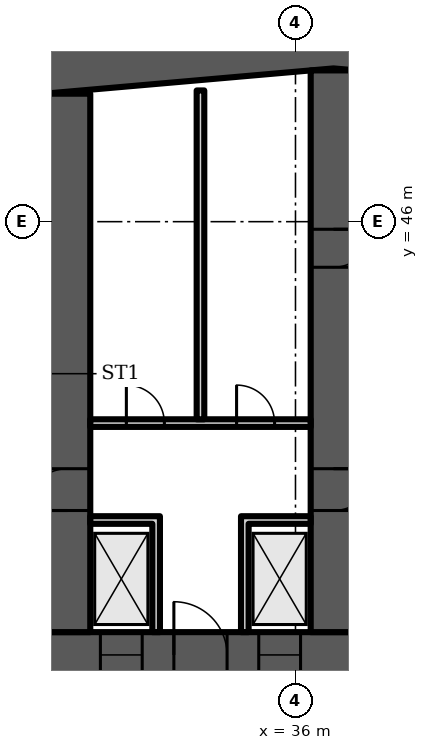
"""IFC4 building model, lengths in metres.
Left out: names, types, materials, properties, quantities, classifications, styles, units other than length and angle.
Written with IfcOpenShell. Run it as: python <this file> out.ifc"""

import sys

from ifc_helpers import new_model, si_unit, direction, frame, frame_2d, origin, place, context, subcontext, project, spatial, polyline, rectangle, outline, extrude, element, fill, save


model = new_model("IFC4")
c1 = context("Model", 3, precision=1e-05, world=origin(), true_north=direction((0.0, 1.0)))
c2 = subcontext(c1, "Body", "Model", "MODEL_VIEW")
j1 = project(units=[si_unit("LENGTHUNIT", "METRE"), si_unit("PLANEANGLEUNIT", "RADIAN")], contexts=[c1])
p1 = place(None, origin())
s1 = spatial("IfcSite", under=j1, at=p1, CompositionType="ELEMENT")
p2 = place(p1, origin())
s2 = spatial("IfcBuilding", under=s1, at=p2, CompositionType="ELEMENT")
p3 = place(p2, frame((0.0, 0.0, 70.3)))
s3 = spatial("IfcBuildingStorey", under=s2, at=p3, CompositionType="ELEMENT", Elevation=70.3)
p4 = place(p3, frame((0.0, 0.0, -0.0)))
e1 = element("IfcWall", 1, at=p4, inside=s3, PredefinedType="SHEAR", context=c2, shape_type="SweptSolid", body=[
    extrude(outline(polyline([(9.0, 47.583), (37.0, 50.032), (65.0, 47.583), (65.0, 48.787), (37.0, 51.237), (9.0, 48.787), (9.0, 47.583)])), origin(), (0.0, 0.0, 1.0), 3.6),
])
p5 = place(p3, frame((9.0, 34.6, 0.0), z_axis=(0.0, 0.0, 1.0), x_axis=(1.0, 0.0, 0.0)))
e2 = element("IfcWall", 2, at=p5, inside=s3, PredefinedType="SHEAR", context=c2, shape_type="SweptSolid", body=[
    extrude(rectangle(XDim=56.0, YDim=1.2, at=frame_2d((28.0, 0.0))), origin(), (0.0, 0.0, 1.0), 3.6),
])
p6 = place(p5, frame((3.3, 0.0, 0.0)))
e3 = element("IfcOpeningElement", 3, at=p6, cuts=e2, PredefinedType="OPENING", context=c2, shape_type="SweptSolid", body=[
    extrude(rectangle(XDim=1.0, YDim=2.1, at=frame_2d((0.5, 1.05))), frame((0.0, 0.61, 0.0), z_axis=(0.0, -1.0, 0.0), x_axis=(1.0, 0.0, 0.0)), (0.0, 0.0, 1.0), 1.22),
])
p7 = place(p5, frame((7.867, 0.0, 0.0)))
e4 = element("IfcOpeningElement", 4, at=p7, cuts=e2, PredefinedType="OPENING", context=c2, shape_type="SweptSolid", body=[
    extrude(rectangle(XDim=1.1, YDim=2.1, at=frame_2d((0.55, 1.05))), frame((0.0, 0.61, 0.0), z_axis=(0.0, -1.0, 0.0), x_axis=(1.0, 0.0, 0.0)), (0.0, 0.0, 1.0), 1.22),
])
p8 = place(p5, frame((12.033, 0.0, 0.0)))
e5 = element("IfcOpeningElement", 5, at=p8, cuts=e2, PredefinedType="OPENING", context=c2, shape_type="SweptSolid", body=[
    extrude(rectangle(XDim=1.1, YDim=2.1, at=frame_2d((0.55, 1.05))), frame((0.0, 0.61, 0.0), z_axis=(0.0, -1.0, 0.0), x_axis=(1.0, 0.0, 0.0)), (0.0, 0.0, 1.0), 1.22),
])
p9 = place(p5, frame((9.8, 0.0, 0.0)))
e6 = element("IfcOpeningElement", 6, at=p9, cuts=e2, PredefinedType="OPENING", context=c2, shape_type="SweptSolid", body=[
    extrude(rectangle(XDim=1.4, YDim=2.1, at=frame_2d((0.7, 1.05))), frame((0.0, 0.61, 0.0), z_axis=(0.0, -1.0, 0.0), x_axis=(1.0, 0.0, 0.0)), (0.0, 0.0, 1.0), 1.22),
])
p10 = place(p5, frame((14.65, 0.0, 0.0)))
e7 = element("IfcOpeningElement", 7, at=p10, cuts=e2, PredefinedType="OPENING", context=c2, shape_type="SweptSolid", body=[
    extrude(rectangle(XDim=1.2, YDim=2.1, at=frame_2d((0.6, 1.05))), frame((0.0, 0.61, 0.0), z_axis=(0.0, -1.0, 0.0), x_axis=(1.0, 0.0, 0.0)), (0.0, 0.0, 1.0), 1.22),
])
p11 = place(p5, frame((21.867, 0.0, 0.0)))
e8 = element("IfcOpeningElement", 8, at=p11, cuts=e2, PredefinedType="OPENING", context=c2, shape_type="SweptSolid", body=[
    extrude(rectangle(XDim=1.1, YDim=2.1, at=frame_2d((0.55, 1.05))), frame((0.0, 0.61, 0.0), z_axis=(0.0, -1.0, 0.0), x_axis=(1.0, 0.0, 0.0)), (0.0, 0.0, 1.0), 1.22),
])
p12 = place(p5, frame((26.033, 0.0, 0.0)))
e9 = element("IfcOpeningElement", 9, at=p12, cuts=e2, PredefinedType="OPENING", context=c2, shape_type="SweptSolid", body=[
    extrude(rectangle(XDim=1.1, YDim=2.1, at=frame_2d((0.55, 1.05))), frame((0.0, 0.61, 0.0), z_axis=(0.0, -1.0, 0.0), x_axis=(1.0, 0.0, 0.0)), (0.0, 0.0, 1.0), 1.22),
])
p13 = place(p5, frame((23.8, 0.0, 0.0)))
e10 = element("IfcOpeningElement", 10, at=p13, cuts=e2, PredefinedType="OPENING", context=c2, shape_type="SweptSolid", body=[
    extrude(rectangle(XDim=1.4, YDim=2.1, at=frame_2d((0.7, 1.05))), frame((0.0, 0.61, 0.0), z_axis=(0.0, -1.0, 0.0), x_axis=(1.0, 0.0, 0.0)), (0.0, 0.0, 1.0), 1.22),
])
p14 = place(p5, frame((28.867, 0.0, 0.0)))
e11 = element("IfcOpeningElement", 11, at=p14, cuts=e2, PredefinedType="OPENING", context=c2, shape_type="SweptSolid", body=[
    extrude(rectangle(XDim=1.1, YDim=2.1, at=frame_2d((0.55, 1.05))), frame((0.0, 0.61, 0.0), z_axis=(0.0, -1.0, 0.0), x_axis=(1.0, 0.0, 0.0)), (0.0, 0.0, 1.0), 1.22),
])
p15 = place(p5, frame((33.033, 0.0, 0.0)))
e12 = element("IfcOpeningElement", 12, at=p15, cuts=e2, PredefinedType="OPENING", context=c2, shape_type="SweptSolid", body=[
    extrude(rectangle(XDim=1.1, YDim=2.1, at=frame_2d((0.55, 1.05))), frame((0.0, 0.61, 0.0), z_axis=(0.0, -1.0, 0.0), x_axis=(1.0, 0.0, 0.0)), (0.0, 0.0, 1.0), 1.22),
])
p16 = place(p5, frame((40.15, 0.0, 0.0)))
e13 = element("IfcOpeningElement", 13, at=p16, cuts=e2, PredefinedType="OPENING", context=c2, shape_type="SweptSolid", body=[
    extrude(rectangle(XDim=1.2, YDim=2.1, at=frame_2d((0.6, 1.05))), frame((0.0, 0.61, 0.0), z_axis=(0.0, -1.0, 0.0), x_axis=(1.0, 0.0, 0.0)), (0.0, 0.0, 1.0), 1.22),
])
p17 = place(p5, frame((44.8, 0.0, 0.0)))
e14 = element("IfcOpeningElement", 14, at=p17, cuts=e2, PredefinedType="OPENING", context=c2, shape_type="SweptSolid", body=[
    extrude(rectangle(XDim=1.4, YDim=2.1, at=frame_2d((0.7, 1.05))), frame((0.0, 0.61, 0.0), z_axis=(0.0, -1.0, 0.0), x_axis=(1.0, 0.0, 0.0)), (0.0, 0.0, 1.0), 1.22),
])
p18 = place(p5, frame((49.867, 0.0, 0.0)))
e15 = element("IfcOpeningElement", 15, at=p18, cuts=e2, PredefinedType="OPENING", context=c2, shape_type="SweptSolid", body=[
    extrude(rectangle(XDim=1.1, YDim=2.1, at=frame_2d((0.55, 1.05))), frame((0.0, 0.61, 0.0), z_axis=(0.0, -1.0, 0.0), x_axis=(1.0, 0.0, 0.0)), (0.0, 0.0, 1.0), 1.22),
])
p19 = place(p5, frame((53.5, 0.0, 0.0)))
e16 = element("IfcOpeningElement", 16, at=p19, cuts=e2, PredefinedType="OPENING", context=c2, shape_type="SweptSolid", body=[
    extrude(rectangle(XDim=1.1, YDim=2.1, at=frame_2d((0.55, 1.05))), frame((0.0, 0.61, 0.0), z_axis=(0.0, -1.0, 0.0), x_axis=(1.0, 0.0, 0.0)), (0.0, 0.0, 1.0), 1.22),
])
p20 = place(p5, frame((51.567, 0.0, 0.0)))
e17 = element("IfcOpeningElement", 17, at=p20, cuts=e2, PredefinedType="OPENING", context=c2, shape_type="SweptSolid", body=[
    extrude(rectangle(XDim=1.4, YDim=2.1, at=frame_2d((0.7, 1.05))), frame((0.0, 0.61, 0.0), z_axis=(0.0, -1.0, 0.0), x_axis=(1.0, 0.0, 0.0)), (0.0, 0.0, 1.0), 1.22),
])
p21 = place(p3, frame((30.0, 35.2, 0.0), z_axis=(0.0, 0.0, 1.0), x_axis=(0.0, 1.0, 0.0)))
e18 = element("IfcWall", 18, at=p21, inside=s3, PredefinedType="SHEAR", context=c2, shape_type="SweptSolid", body=[
    extrude(rectangle(XDim=14.168, YDim=1.2, at=frame_2d((7.084, 0.0))), origin(), (0.0, 0.0, 1.0), 3.6),
])
p22 = place(p21, frame((3.2, 0.0, 0.0)))
e19 = element("IfcOpeningElement", 19, at=p22, cuts=e18, PredefinedType="OPENING", context=c2, shape_type="SweptSolid", body=[
    extrude(rectangle(XDim=1.1, YDim=2.1, at=frame_2d((0.55, 1.05))), frame((0.0, 0.61, 0.0), z_axis=(0.0, -1.0, 0.0), x_axis=(1.0, 0.0, 0.0)), (0.0, 0.0, 1.0), 1.22),
])
p23 = place(p3, frame((37.0, 35.2, 0.0), z_axis=(0.0, 0.0, 1.0), x_axis=(0.0, 1.0, 0.0)))
e20 = element("IfcWall", 20, at=p23, inside=s3, PredefinedType="SHEAR", context=c2, shape_type="SweptSolid", body=[
    extrude(rectangle(XDim=14.78, YDim=1.2, at=frame_2d((7.39, 0.0))), origin(), (0.0, 0.0, 1.0), 3.6),
])
p24 = place(p23, frame((3.2, 0.0, 0.0)))
e21 = element("IfcOpeningElement", 21, at=p24, cuts=e20, PredefinedType="OPENING", context=c2, shape_type="SweptSolid", body=[
    extrude(rectangle(XDim=1.1, YDim=2.1, at=frame_2d((0.55, 1.05))), frame((0.0, 0.61, 0.0), z_axis=(0.0, -1.0, 0.0), x_axis=(1.0, 0.0, 0.0)), (0.0, 0.0, 1.0), 1.22),
])
p25 = place(p23, frame((9.6, 0.0, 0.0)))
e22 = element("IfcOpeningElement", 22, at=p25, cuts=e20, PredefinedType="OPENING", context=c2, shape_type="SweptSolid", body=[
    extrude(rectangle(XDim=1.0, YDim=2.1, at=frame_2d((0.5, 1.05))), frame((0.0, 0.61, 0.0), z_axis=(0.0, -1.0, 0.0), x_axis=(1.0, 0.0, 0.0)), (0.0, 0.0, 1.0), 1.22),
])
p26 = place(p3, frame((30.6, 40.7, 0.0), z_axis=(0.0, 0.0, 1.0), x_axis=(1.0, 0.0, 0.0)))
e23 = element("IfcWall", 23, at=p26, inside=s3, PredefinedType="PARTITIONING", context=c2, shape_type="SweptSolid", body=[
    extrude(rectangle(XDim=5.8, YDim=0.2, at=frame_2d((2.9, 0.0))), origin(), (0.0, 0.0, 1.0), 3.2),
])
p27 = place(p26, frame((0.95, 0.0, 0.0)))
e24 = element("IfcOpeningElement", 24, at=p27, cuts=e23, PredefinedType="OPENING", context=c2, shape_type="SweptSolid", body=[
    extrude(rectangle(XDim=1.0, YDim=2.1, at=frame_2d((0.5, 1.05))), frame((0.0, 0.11, 0.0), z_axis=(0.0, -1.0, 0.0), x_axis=(1.0, 0.0, 0.0)), (0.0, 0.0, 1.0), 0.22),
])
p28 = place(p26, frame((3.85, 0.0, 0.0)))
e25 = element("IfcOpeningElement", 25, at=p28, cuts=e23, PredefinedType="OPENING", context=c2, shape_type="SweptSolid", body=[
    extrude(rectangle(XDim=1.0, YDim=2.1, at=frame_2d((0.5, 1.05))), frame((0.0, 0.11, 0.0), z_axis=(0.0, -1.0, 0.0), x_axis=(1.0, 0.0, 0.0)), (0.0, 0.0, 1.0), 0.22),
])
p29 = place(p3, frame((0.0, 0.0, -0.0)))
e26 = element("IfcWall", 26, at=p29, inside=s3, PredefinedType="PARTITIONING", context=c2, shape_type="SweptSolid", body=[
    extrude(outline(polyline([(32.233, 38.05), (30.6, 38.05), (30.6, 38.25), (32.233, 38.25), (32.433, 38.25), (32.433, 35.2), (32.233, 35.2), (32.233, 38.05)])), origin(), (0.0, 0.0, 1.0), 3.2),
])
p30 = place(p3, frame((0.0, 0.0, -0.0)))
e27 = element("IfcWall", 27, at=p30, inside=s3, PredefinedType="PARTITIONING", context=c2, shape_type="SweptSolid", body=[
    extrude(outline(polyline([(34.567, 38.25), (34.767, 38.25), (36.4, 38.25), (36.4, 38.05), (34.767, 38.05), (34.767, 35.2), (34.567, 35.2), (34.567, 38.25)])), origin(), (0.0, 0.0, 1.0), 3.2),
])
p31 = place(p3, frame((33.5, 40.8, 0.0), z_axis=(0.0, 0.0, 1.0), x_axis=(0.0, 1.0, 0.0)))
e28 = element("IfcWall", 28, at=p31, inside=s3, PredefinedType="PARTITIONING", context=c2, shape_type="SweptSolid", body=[
    extrude(rectangle(XDim=8.653, YDim=0.2, at=frame_2d((4.326, 0.0))), origin(), (0.0, 0.0, 1.0), 3.2),
])
p32 = place(p11, origin())
e29 = element("IfcDoor", 29, at=p32, inside=s3, OperationType="DOUBLE_DOOR_SLIDING", PredefinedType="DOOR", context=c2, shape_type="SweptSolid", body=[
    extrude(rectangle(XDim=1.1, YDim=2.1, at=frame_2d((0.55, 1.05))), frame((0.0, 0.025, 0.0), z_axis=(0.0, -1.0, 0.0), x_axis=(1.0, 0.0, 0.0)), (0.0, 0.0, 1.0), 0.05),
])
fill(e8, e29)
p33 = place(p12, origin())
e30 = element("IfcDoor", 30, at=p33, inside=s3, OperationType="DOUBLE_DOOR_SLIDING", PredefinedType="DOOR", context=c2, shape_type="SweptSolid", body=[
    extrude(rectangle(XDim=1.1, YDim=2.1, at=frame_2d((0.55, 1.05))), frame((0.0, 0.025, 0.0), z_axis=(0.0, -1.0, 0.0), x_axis=(1.0, 0.0, 0.0)), (0.0, 0.0, 1.0), 0.05),
])
fill(e9, e30)
p34 = place(p13, origin())
e31 = element("IfcDoor", 31, at=p34, inside=s3, OperationType="DOUBLE_DOOR_SINGLE_SWING", PredefinedType="DOOR", context=c2, shape_type="SweptSolid", body=[
    extrude(rectangle(XDim=1.4, YDim=2.1, at=frame_2d((0.7, 1.05))), frame((0.0, 0.025, 0.0), z_axis=(0.0, -1.0, 0.0), x_axis=(1.0, 0.0, 0.0)), (0.0, 0.0, 1.0), 0.05),
])
fill(e10, e31)
p35 = place(p27, origin())
e32 = element("IfcDoor", 32, at=p35, inside=s3, OperationType="SINGLE_SWING_LEFT", PredefinedType="DOOR", context=c2, shape_type="SweptSolid", body=[
    extrude(rectangle(XDim=1.0, YDim=2.1, at=frame_2d((0.5, 1.05))), frame((0.0, 0.025, 0.0), z_axis=(0.0, -1.0, 0.0), x_axis=(1.0, 0.0, 0.0)), (0.0, 0.0, 1.0), 0.05),
])
fill(e24, e32)
p36 = place(p28, origin())
e33 = element("IfcDoor", 33, at=p36, inside=s3, OperationType="SINGLE_SWING_LEFT", PredefinedType="DOOR", context=c2, shape_type="SweptSolid", body=[
    extrude(rectangle(XDim=1.0, YDim=2.1, at=frame_2d((0.5, 1.05))), frame((0.0, 0.025, 0.0), z_axis=(0.0, -1.0, 0.0), x_axis=(1.0, 0.0, 0.0)), (0.0, 0.0, 1.0), 0.05),
])
fill(e25, e33)
p37 = place(p22, origin())
e34 = element("IfcDoor", 34, at=p37, inside=s3, OperationType="SINGLE_SWING_LEFT", PredefinedType="DOOR", context=c2, shape_type="SweptSolid", body=[
    extrude(rectangle(XDim=1.1, YDim=2.1, at=frame_2d((0.55, 1.05))), frame((0.0, 0.025, 0.0), z_axis=(0.0, -1.0, 0.0), x_axis=(1.0, 0.0, 0.0)), (0.0, 0.0, 1.0), 0.05),
])
fill(e19, e34)
p38 = place(p24, origin())
e35 = element("IfcDoor", 35, at=p38, inside=s3, OperationType="SINGLE_SWING_RIGHT", PredefinedType="DOOR", context=c2, shape_type="SweptSolid", body=[
    extrude(rectangle(XDim=1.1, YDim=2.1, at=frame_2d((0.55, 1.05))), frame((0.0, 0.025, 0.0), z_axis=(0.0, -1.0, 0.0), x_axis=(1.0, 0.0, 0.0)), (0.0, 0.0, 1.0), 0.05),
])
fill(e21, e35)
p39 = place(p25, origin())
e36 = element("IfcDoor", 36, at=p39, inside=s3, OperationType="SINGLE_SWING_RIGHT", PredefinedType="DOOR", context=c2, shape_type="SweptSolid", body=[
    extrude(rectangle(XDim=1.0, YDim=2.1, at=frame_2d((0.5, 1.05))), frame((0.0, 0.6, 0.0), z_axis=(0.0, -1.0, 0.0), x_axis=(1.0, 0.0, 0.0)), (0.0, 0.0, 1.0), 1.199),
])
fill(e22, e36)
save(model, sys.argv[1])
